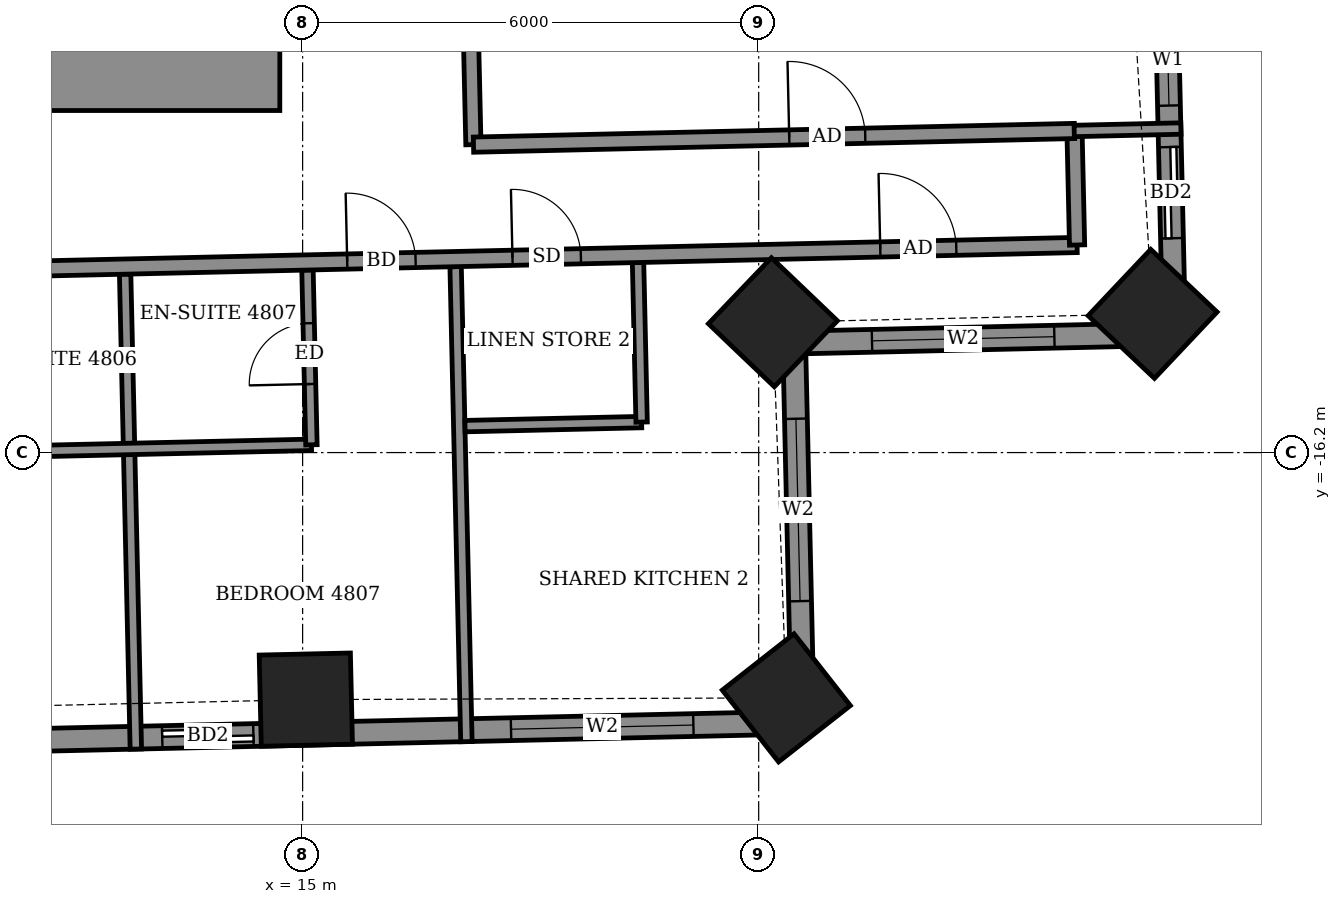
"""IFC4 building model, lengths in metres.
Left out: names, types, materials, properties, quantities, classifications, styles, units other than length and angle.
Written with IfcOpenShell. Run it as: python <this file> out.ifc"""

import sys

from ifc_helpers import new_model, si_unit, direction, frame, frame_2d, origin, origin_2d, place, context, subcontext, project, spatial, rectangle, extrude, element, fill, save


model = new_model("IFC4")
c1 = context("Model", 3, precision=1e-05, world=origin(), true_north=direction((0.0, 1.0)))
c2 = subcontext(c1, "Body", "Model", "MODEL_VIEW")
j1 = project(units=[si_unit("LENGTHUNIT", "METRE"), si_unit("PLANEANGLEUNIT", "RADIAN")], contexts=[c1])
p1 = place(None, origin())
s1 = spatial("IfcSite", under=j1, at=p1, CompositionType="ELEMENT")
p2 = place(p1, origin())
s2 = spatial("IfcBuilding", under=s1, at=p2, CompositionType="ELEMENT")
p3 = place(p2, frame((0.0, 0.0, 189.7)))
s3 = spatial("IfcBuildingStorey", under=s2, at=p3, CompositionType="ELEMENT", Elevation=189.7)
for number, where, z_axis, x_axis in (
    (1, (15.042, -19.45, -0.55), (0.0, 0.0, 1.0), (1.0, 0.023, 0.0)),
    (2, (21.364, -19.427, -0.55), (0.0, 0.0, 1.0), (0.787, 0.617, 0.0)),
    (3, (21.187, -14.486, -0.55), (0.0, 0.0, 1.0), (0.691, 0.723, 0.0)),
    (4, (26.183, -14.375, -0.55), (0.0, 0.0, 1.0), (0.686, 0.727, 0.0)),
):
    element("IfcColumn", number, at=place(p3, frame(where, z_axis=z_axis, x_axis=x_axis)), inside=s3, PredefinedType="COLUMN", context=c2, shape_type="SweptSolid", body=[
        extrude(rectangle(XDim=1.2, YDim=1.2, at=origin_2d()), origin(), (0.0, 0.0, 1.0), 3.6),
    ])
p4 = place(p3, frame((26.466, -14.64, 0.0), z_axis=(0.0, 0.0, 1.0), x_axis=(-0.022735782058, 0.999741508698, 0.0)))
e5 = element("IfcWall", 5, at=p4, inside=s3, PredefinedType="SOLIDWALL", context=c2, shape_type="SweptSolid", body=[
    extrude(rectangle(XDim=10.03, YDim=0.3, at=frame_2d((5.015, 0.0))), origin(), (0.0, 0.0, 1.0), 2.55),
])
p5 = place(p4, frame((1.26, 0.0, 0.0)))
e6 = element("IfcOpeningElement", 6, at=p5, cuts=e5, PredefinedType="OPENING", context=c2, shape_type="SweptSolid", body=[
    extrude(rectangle(XDim=1.2, YDim=2.4, at=frame_2d((0.6, 1.2))), frame((0.0, 0.16, 0.0), z_axis=(0.0, -1.0, 0.0), x_axis=(1.0, 0.0, 0.0)), (0.0, 0.0, 1.0), 0.32),
])
p6 = place(p4, frame((3.006, 0.0, 0.9)))
e7 = element("IfcOpeningElement", 7, at=p6, cuts=e5, PredefinedType="OPENING", context=c2, shape_type="SweptSolid", body=[
    extrude(rectangle(XDim=1.2, YDim=1.5, at=frame_2d((0.6, 0.75))), frame((0.0, 0.16, 0.0), z_axis=(0.0, -1.0, 0.0), x_axis=(1.0, 0.0, 0.0)), (0.0, 0.0, 1.0), 0.32),
])
p7 = place(p3, frame((-18.189, -20.655, 0.0), z_axis=(0.0, 0.0, 1.0), x_axis=(0.999742285265, 0.022701609063, 0.0)))
e8 = element("IfcWall", 8, at=p7, inside=s3, PredefinedType="SOLIDWALL", context=c2, shape_type="SweptSolid", body=[
    extrude(rectangle(XDim=39.78, YDim=0.3, at=frame_2d((19.89, 0.0))), origin(), (0.0, 0.0, 1.0), 3.05),
])
p8 = place(p7, frame((1.948, 0.0, 0.0)))
e9 = element("IfcOpeningElement", 9, at=p8, cuts=e8, PredefinedType="OPENING", context=c2, shape_type="SweptSolid", body=[
    extrude(rectangle(XDim=1.5, YDim=2.4, at=frame_2d((0.75, 1.2))), frame((0.0, 0.16, 0.0), z_axis=(0.0, -1.0, 0.0), x_axis=(1.0, 0.0, 0.0)), (0.0, 0.0, 1.0), 0.32),
])
p9 = place(p7, frame((7.24, 0.0, 0.0)))
e10 = element("IfcOpeningElement", 10, at=p9, cuts=e8, PredefinedType="OPENING", context=c2, shape_type="SweptSolid", body=[
    extrude(rectangle(XDim=1.5, YDim=2.4, at=frame_2d((0.75, 1.2))), frame((0.0, 0.16, 0.0), z_axis=(0.0, -1.0, 0.0), x_axis=(1.0, 0.0, 0.0)), (0.0, 0.0, 1.0), 0.32),
])
p10 = place(p7, frame((10.23, 0.0, 0.0)))
e11 = element("IfcOpeningElement", 11, at=p10, cuts=e8, PredefinedType="OPENING", context=c2, shape_type="SweptSolid", body=[
    extrude(rectangle(XDim=1.5, YDim=2.4, at=frame_2d((0.75, 1.2))), frame((0.0, 0.16, 0.0), z_axis=(0.0, -1.0, 0.0), x_axis=(1.0, 0.0, 0.0)), (0.0, 0.0, 1.0), 0.32),
])
p11 = place(p7, frame((14.955, 0.0, 0.0)))
e12 = element("IfcOpeningElement", 12, at=p11, cuts=e8, PredefinedType="OPENING", context=c2, shape_type="SweptSolid", body=[
    extrude(rectangle(XDim=1.5, YDim=2.4, at=frame_2d((0.75, 1.2))), frame((0.0, 0.16, 0.0), z_axis=(0.0, -1.0, 0.0), x_axis=(1.0, 0.0, 0.0)), (0.0, 0.0, 1.0), 0.32),
])
p12 = place(p7, frame((20.67, 0.0, 0.0)))
e13 = element("IfcOpeningElement", 13, at=p12, cuts=e8, PredefinedType="OPENING", context=c2, shape_type="SweptSolid", body=[
    extrude(rectangle(XDim=1.2, YDim=2.4, at=frame_2d((0.6, 1.2))), frame((0.0, 0.16, 0.0), z_axis=(0.0, -1.0, 0.0), x_axis=(1.0, 0.0, 0.0)), (0.0, 0.0, 1.0), 0.32),
])
p13 = place(p7, frame((23.51, 0.0, 0.0)))
e14 = element("IfcOpeningElement", 14, at=p13, cuts=e8, PredefinedType="OPENING", context=c2, shape_type="SweptSolid", body=[
    extrude(rectangle(XDim=1.5, YDim=2.4, at=frame_2d((0.75, 1.2))), frame((0.0, 0.16, 0.0), z_axis=(0.0, -1.0, 0.0), x_axis=(1.0, 0.0, 0.0)), (0.0, 0.0, 1.0), 0.32),
])
p14 = place(p7, frame((28.21, 0.0, 0.0)))
e15 = element("IfcOpeningElement", 15, at=p14, cuts=e8, PredefinedType="OPENING", context=c2, shape_type="SweptSolid", body=[
    extrude(rectangle(XDim=1.5, YDim=2.4, at=frame_2d((0.75, 1.2))), frame((0.0, 0.16, 0.0), z_axis=(0.0, -1.0, 0.0), x_axis=(1.0, 0.0, 0.0)), (0.0, 0.0, 1.0), 0.32),
])
p15 = place(p7, frame((31.35, 0.0, 0.0)))
e16 = element("IfcOpeningElement", 16, at=p15, cuts=e8, PredefinedType="OPENING", context=c2, shape_type="SweptSolid", body=[
    extrude(rectangle(XDim=1.2, YDim=2.4, at=frame_2d((0.6, 1.2))), frame((0.0, 0.16, 0.0), z_axis=(0.0, -1.0, 0.0), x_axis=(1.0, 0.0, 0.0)), (0.0, 0.0, 1.0), 0.32),
])
p16 = place(p7, frame((35.94, 0.0, 0.9)))
e17 = element("IfcOpeningElement", 17, at=p16, cuts=e8, PredefinedType="OPENING", context=c2, shape_type="SweptSolid", body=[
    extrude(rectangle(XDim=2.4, YDim=1.5, at=frame_2d((1.2, 0.75))), frame((0.0, 0.16, 0.0), z_axis=(0.0, -1.0, 0.0), x_axis=(1.0, 0.0, 0.0)), (0.0, 0.0, 1.0), 0.32),
])
p17 = place(p3, frame((21.581, -19.752, 0.0), z_axis=(0.0, 0.0, 1.0), x_axis=(-0.022801259434, 0.999740017489, 0.0)))
e18 = element("IfcWall", 18, at=p17, inside=s3, PredefinedType="SOLIDWALL", context=c2, shape_type="SweptSolid", body=[
    extrude(rectangle(XDim=5.0, YDim=0.3, at=frame_2d((2.5, 0.0))), origin(), (0.0, 0.0, 1.0), 2.55),
])
p18 = place(p17, frame((1.598, 0.0, 0.9)))
e19 = element("IfcOpeningElement", 19, at=p18, cuts=e18, PredefinedType="OPENING", context=c2, shape_type="SweptSolid", body=[
    extrude(rectangle(XDim=2.4, YDim=1.5, at=frame_2d((1.2, 0.75))), frame((0.0, 0.16, 0.0), z_axis=(0.0, -1.0, 0.0), x_axis=(1.0, 0.0, 0.0)), (0.0, 0.0, 1.0), 0.32),
])
p19 = place(p3, frame((21.467, -14.753, 0.0), z_axis=(0.0, 0.0, 1.0), x_axis=(0.999744450377, 0.022606059803, 0.0)))
e20 = element("IfcWall", 20, at=p19, inside=s3, PredefinedType="SOLIDWALL", context=c2, shape_type="SweptSolid", body=[
    extrude(rectangle(XDim=5.0, YDim=0.3, at=frame_2d((2.5, 0.0))), origin(), (0.0, 0.0, 1.0), 2.55),
])
p20 = place(p19, frame((1.024, 0.0, 0.9)))
e21 = element("IfcOpeningElement", 21, at=p20, cuts=e20, PredefinedType="OPENING", context=c2, shape_type="SweptSolid", body=[
    extrude(rectangle(XDim=2.4, YDim=1.5, at=frame_2d((1.2, 0.75))), frame((0.0, 0.16, 0.0), z_axis=(0.0, -1.0, 0.0), x_axis=(1.0, 0.0, 0.0)), (0.0, 0.0, 1.0), 0.32),
])
p21 = place(p3, frame((12.806, -20.101, 0.0), z_axis=(0.0, 0.0, 1.0), x_axis=(-0.022540379945, 0.999745933361, 0.0)))
e22 = element("IfcWall", 22, at=p21, inside=s3, PredefinedType="PARTITIONING", context=c2, shape_type="SweptSolid", body=[
    extrude(rectangle(XDim=6.25, YDim=0.15, at=frame_2d((3.125, 0.0))), origin(), (0.0, 0.0, 1.0), 2.55),
])
p22 = place(p3, frame((17.155, -20.003, 0.0), z_axis=(0.0, 0.0, 1.0), x_axis=(-0.022732052173, 0.999741593515, 0.0)))
e23 = element("IfcWall", 23, at=p22, inside=s3, PredefinedType="PARTITIONING", context=c2, shape_type="SweptSolid", body=[
    extrude(rectangle(XDim=6.251, YDim=0.15, at=frame_2d((3.125, 0.0))), origin(), (0.0, 0.0, 1.0), 2.55),
])
p23 = place(p3, frame((10.317, -16.207, 0.0), z_axis=(0.0, 0.0, 1.0), x_axis=(0.99974154664, 0.022734113616, 0.0)))
e24 = element("IfcWall", 24, at=p23, inside=s3, PredefinedType="PARTITIONING", context=c2, shape_type="SweptSolid", body=[
    extrude(rectangle(XDim=4.8, YDim=0.15, at=frame_2d((2.4, 0.0))), origin(), (0.0, 0.0, 1.0), 3.05),
])
p24 = place(p3, frame((15.116, -16.098, 0.0), z_axis=(0.0, 0.0, 1.0), x_axis=(-0.022615284993, 0.999744241736, 0.0)))
e25 = element("IfcWall", 25, at=p24, inside=s3, PredefinedType="PARTITIONING", context=c2, shape_type="SweptSolid", body=[
    extrude(rectangle(XDim=2.299, YDim=0.15, at=frame_2d((1.15, 0.0))), origin(), (0.0, 0.0, 1.0), 3.05),
])
p25 = place(p24, frame((0.8, 0.0, 0.0)))
e26 = element("IfcOpeningElement", 26, at=p25, cuts=e25, PredefinedType="OPENING", context=c2, shape_type="SweptSolid", body=[
    extrude(rectangle(XDim=0.8, YDim=2.1, at=frame_2d((0.4, 1.05))), frame((0.0, 0.085, 0.0), z_axis=(0.0, -1.0, 0.0), x_axis=(1.0, 0.0, 0.0)), (0.0, 0.0, 1.0), 0.17),
])
p26 = place(p3, frame((17.136, -15.852, 0.0), z_axis=(0.0, 0.0, 1.0), x_axis=(0.999740260747, 0.02279059109, 0.0)))
e27 = element("IfcWall", 27, at=p26, inside=s3, PredefinedType="PARTITIONING", context=c2, shape_type="SweptSolid", body=[
    extrude(rectangle(XDim=2.324, YDim=0.15, at=frame_2d((1.162, 0.0))), origin(), (0.0, 0.0, 1.0), 3.05),
])
p27 = place(p3, frame((19.46, -15.799, 0.0), z_axis=(0.0, 0.0, 1.0), x_axis=(-0.022325208909, 0.999750761464, 0.0)))
e28 = element("IfcWall", 28, at=p27, inside=s3, PredefinedType="PARTITIONING", context=c2, shape_type="SweptSolid", body=[
    extrude(rectangle(XDim=2.1, YDim=0.15, at=frame_2d((1.05, 0.0))), origin(), (0.0, 0.0, 1.0), 3.05),
])
p28 = place(p3, frame((-21.279, -14.523, 0.0), z_axis=(0.0, 0.0, 1.0), x_axis=(0.999742878501, 0.022675468818, 0.0)))
e29 = element("IfcWall", 29, at=p28, inside=s3, PredefinedType="PARTITIONING", context=c2, shape_type="SweptSolid", body=[
    extrude(rectangle(XDim=46.48, YDim=0.2, at=frame_2d((23.24, 0.0))), origin(), (0.0, 0.0, 1.0), 3.05),
])
p29 = place(p28, frame((1.4, 0.0, 0.0)))
e30 = element("IfcOpeningElement", 30, at=p29, cuts=e29, PredefinedType="OPENING", context=c2, shape_type="SweptSolid", body=[
    extrude(rectangle(XDim=1.0, YDim=2.1, at=frame_2d((0.5, 1.05))), frame((0.0, 0.11, 0.0), z_axis=(0.0, -1.0, 0.0), x_axis=(1.0, 0.0, 0.0)), (0.0, 0.0, 1.0), 0.22),
])
p30 = place(p28, frame((5.95, 0.0, 0.0)))
e31 = element("IfcOpeningElement", 31, at=p30, cuts=e29, PredefinedType="OPENING", context=c2, shape_type="SweptSolid", body=[
    extrude(rectangle(XDim=0.9, YDim=2.1, at=frame_2d((0.45, 1.05))), frame((0.0, 0.11, 0.0), z_axis=(0.0, -1.0, 0.0), x_axis=(1.0, 0.0, 0.0)), (0.0, 0.0, 1.0), 0.22),
])
p31 = place(p28, frame((10.575, 0.0, 0.0)))
e32 = element("IfcOpeningElement", 32, at=p31, cuts=e29, PredefinedType="OPENING", context=c2, shape_type="SweptSolid", body=[
    extrude(rectangle(XDim=0.9, YDim=2.1, at=frame_2d((0.45, 1.05))), frame((0.0, 0.11, 0.0), z_axis=(0.0, -1.0, 0.0), x_axis=(1.0, 0.0, 0.0)), (0.0, 0.0, 1.0), 0.22),
])
p32 = place(p28, frame((12.625, 0.0, 0.0)))
e33 = element("IfcOpeningElement", 33, at=p32, cuts=e29, PredefinedType="OPENING", context=c2, shape_type="SweptSolid", body=[
    extrude(rectangle(XDim=0.9, YDim=2.1, at=frame_2d((0.45, 1.05))), frame((0.0, 0.11, 0.0), z_axis=(0.0, -1.0, 0.0), x_axis=(1.0, 0.0, 0.0)), (0.0, 0.0, 1.0), 0.22),
])
p33 = place(p28, frame((19.4, 0.0, 0.0)))
e34 = element("IfcOpeningElement", 34, at=p33, cuts=e29, PredefinedType="OPENING", context=c2, shape_type="SweptSolid", body=[
    extrude(rectangle(XDim=0.9, YDim=2.1, at=frame_2d((0.45, 1.05))), frame((0.0, 0.11, 0.0), z_axis=(0.0, -1.0, 0.0), x_axis=(1.0, 0.0, 0.0)), (0.0, 0.0, 1.0), 0.22),
])
p34 = place(p28, frame((21.375, 0.0, 0.0)))
e35 = element("IfcOpeningElement", 35, at=p34, cuts=e29, PredefinedType="OPENING", context=c2, shape_type="SweptSolid", body=[
    extrude(rectangle(XDim=0.9, YDim=2.1, at=frame_2d((0.45, 1.05))), frame((0.0, 0.11, 0.0), z_axis=(0.0, -1.0, 0.0), x_axis=(1.0, 0.0, 0.0)), (0.0, 0.0, 1.0), 0.22),
])
p35 = place(p28, frame((28.15, 0.0, 0.0)))
e36 = element("IfcOpeningElement", 36, at=p35, cuts=e29, PredefinedType="OPENING", context=c2, shape_type="SweptSolid", body=[
    extrude(rectangle(XDim=0.9, YDim=2.1, at=frame_2d((0.45, 1.05))), frame((0.0, 0.11, 0.0), z_axis=(0.0, -1.0, 0.0), x_axis=(1.0, 0.0, 0.0)), (0.0, 0.0, 1.0), 0.22),
])
p36 = place(p28, frame((30.1, 0.0, 0.0)))
e37 = element("IfcOpeningElement", 37, at=p36, cuts=e29, PredefinedType="OPENING", context=c2, shape_type="SweptSolid", body=[
    extrude(rectangle(XDim=0.9, YDim=2.1, at=frame_2d((0.45, 1.05))), frame((0.0, 0.11, 0.0), z_axis=(0.0, -1.0, 0.0), x_axis=(1.0, 0.0, 0.0)), (0.0, 0.0, 1.0), 0.22),
])
p37 = place(p28, frame((36.875, 0.0, 0.0)))
e38 = element("IfcOpeningElement", 38, at=p37, cuts=e29, PredefinedType="OPENING", context=c2, shape_type="SweptSolid", body=[
    extrude(rectangle(XDim=0.9, YDim=2.1, at=frame_2d((0.45, 1.05))), frame((0.0, 0.11, 0.0), z_axis=(0.0, -1.0, 0.0), x_axis=(1.0, 0.0, 0.0)), (0.0, 0.0, 1.0), 0.22),
])
p38 = place(p28, frame((43.89, 0.0, 0.0)))
e39 = element("IfcOpeningElement", 39, at=p38, cuts=e29, PredefinedType="OPENING", context=c2, shape_type="SweptSolid", body=[
    extrude(rectangle(XDim=1.0, YDim=2.1, at=frame_2d((0.5, 1.05))), frame((0.0, 0.11, 0.0), z_axis=(0.0, -1.0, 0.0), x_axis=(1.0, 0.0, 0.0)), (0.0, 0.0, 1.0), 0.22),
])
p39 = place(p28, frame((39.05, 0.0, 0.0)))
e40 = element("IfcOpeningElement", 40, at=p39, cuts=e29, PredefinedType="OPENING", context=c2, shape_type="SweptSolid", body=[
    extrude(rectangle(XDim=0.9, YDim=2.1, at=frame_2d((0.45, 1.05))), frame((0.0, 0.11, 0.0), z_axis=(0.0, -1.0, 0.0), x_axis=(1.0, 0.0, 0.0)), (0.0, 0.0, 1.0), 0.22),
])
p40 = place(p3, frame((25.189, -13.469, 0.0), z_axis=(0.0, 0.0, 1.0), x_axis=(-0.022617910375, 0.999744182344, 0.0)))
e41 = element("IfcWall", 41, at=p40, inside=s3, PredefinedType="PARTITIONING", context=c2, shape_type="SweptSolid", body=[
    extrude(rectangle(XDim=1.5, YDim=0.2, at=frame_2d((0.75, 0.0))), origin(), (0.0, 0.0, 1.0), 3.05),
])
p41 = place(p3, frame((17.247, -12.149, 0.0), z_axis=(0.0, 0.0, 1.0), x_axis=(-0.022729111383, 0.999741660378, 0.0)))
e42 = element("IfcWall", 42, at=p41, inside=s3, PredefinedType="PARTITIONING", context=c2, shape_type="SweptSolid", body=[
    extrude(rectangle(XDim=4.318, YDim=0.2, at=frame_2d((2.159, 0.0))), origin(), (0.0, 0.0, 1.0), 3.05),
])
p42 = place(p3, frame((17.248, -12.149, 0.0), z_axis=(0.0, 0.0, 1.0), x_axis=(0.999741181744, 0.022750154412, 0.0)))
e43 = element("IfcWall", 43, at=p42, inside=s3, PredefinedType="PARTITIONING", context=c2, shape_type="SweptSolid", body=[
    extrude(rectangle(XDim=7.909, YDim=0.2, at=frame_2d((3.955, 0.0))), origin(), (0.0, 0.0, 1.0), 3.05),
])
p43 = place(p42, frame((4.155, 0.0, 0.0)))
e44 = element("IfcOpeningElement", 44, at=p43, cuts=e43, PredefinedType="OPENING", context=c2, shape_type="SweptSolid", body=[
    extrude(rectangle(XDim=1.0, YDim=2.1, at=frame_2d((0.5, 1.05))), frame((0.0, 0.11, 0.0), z_axis=(0.0, -1.0, 0.0), x_axis=(1.0, 0.0, 0.0)), (0.0, 0.0, 1.0), 0.22),
])
p44 = place(p3, frame((25.151, -11.969, 0.0), z_axis=(0.0, 0.0, 1.0), x_axis=(0.999740667531, 0.022772739949, 0.0)))
e45 = element("IfcWall", 45, at=p44, inside=s3, PredefinedType="PARTITIONING", context=c2, shape_type="SweptSolid", body=[
    extrude(rectangle(XDim=1.404, YDim=0.15, at=frame_2d((0.702, 0.0))), origin(), (0.0, 0.0, 1.0), 2.55),
])
p45 = place(p3, frame((-14.7, -11.25, 0.0), z_axis=(0.0, 0.0, 1.0), x_axis=(1.0, 0.0, 0.0)))
e46 = element("IfcWall", 46, at=p45, inside=s3, PredefinedType="SHEAR", context=c2, shape_type="SweptSolid", body=[
    extrude(rectangle(XDim=29.4, YDim=0.9, at=frame_2d((14.7, 0.0))), origin(), (0.0, 0.0, 1.0), 3.6),
])
p46 = place(p5, origin())
e47 = element("IfcDoor", 47, at=p46, inside=s3, OperationType="SLIDING_TO_LEFT", PredefinedType="DOOR", context=c2, shape_type="SweptSolid", body=[
    extrude(rectangle(XDim=1.2, YDim=2.4, at=frame_2d((0.6, 1.2))), frame((0.0, 0.025, 0.0), z_axis=(0.0, -1.0, 0.0), x_axis=(1.0, 0.0, 0.0)), (0.0, 0.0, 1.0), 0.05),
])
fill(e6, e47)
p47 = place(p6, origin())
e48 = element("IfcWindow", 48, at=p47, inside=s3, PartitioningType="SINGLE_PANEL", PredefinedType="WINDOW", context=c2, shape_type="SweptSolid", body=[
    extrude(rectangle(XDim=1.2, YDim=1.5, at=frame_2d((0.6, 0.75))), frame((0.0, 0.03, 0.0), z_axis=(0.0, -1.0, 0.0), x_axis=(1.0, 0.0, 0.0)), (0.0, 0.0, 1.0), 0.06),
])
fill(e7, e48)
p48 = place(p15, origin())
e49 = element("IfcDoor", 49, at=p48, inside=s3, OperationType="SLIDING_TO_LEFT", PredefinedType="DOOR", context=c2, shape_type="SweptSolid", body=[
    extrude(rectangle(XDim=1.2, YDim=2.4, at=frame_2d((0.6, 1.2))), frame((0.0, 0.025, 0.0), z_axis=(0.0, -1.0, 0.0), x_axis=(1.0, 0.0, 0.0)), (0.0, 0.0, 1.0), 0.05),
])
fill(e16, e49)
p49 = place(p16, origin())
e50 = element("IfcWindow", 50, at=p49, inside=s3, PartitioningType="DOUBLE_PANEL_VERTICAL", PredefinedType="WINDOW", context=c2, shape_type="SweptSolid", body=[
    extrude(rectangle(XDim=2.4, YDim=1.5, at=frame_2d((1.2, 0.75))), frame((0.0, 0.03, 0.0), z_axis=(0.0, -1.0, 0.0), x_axis=(1.0, 0.0, 0.0)), (0.0, 0.0, 1.0), 0.06),
])
fill(e17, e50)
p50 = place(p18, origin())
e51 = element("IfcWindow", 51, at=p50, inside=s3, PartitioningType="DOUBLE_PANEL_VERTICAL", PredefinedType="WINDOW", context=c2, shape_type="SweptSolid", body=[
    extrude(rectangle(XDim=2.4, YDim=1.5, at=frame_2d((1.2, 0.75))), frame((0.0, 0.03, 0.0), z_axis=(0.0, -1.0, 0.0), x_axis=(1.0, 0.0, 0.0)), (0.0, 0.0, 1.0), 0.06),
])
fill(e19, e51)
p51 = place(p20, origin())
e52 = element("IfcWindow", 52, at=p51, inside=s3, PartitioningType="DOUBLE_PANEL_VERTICAL", PredefinedType="WINDOW", context=c2, shape_type="SweptSolid", body=[
    extrude(rectangle(XDim=2.4, YDim=1.5, at=frame_2d((1.2, 0.75))), frame((0.0, 0.03, 0.0), z_axis=(0.0, -1.0, 0.0), x_axis=(1.0, 0.0, 0.0)), (0.0, 0.0, 1.0), 0.06),
])
fill(e21, e52)
p52 = place(p37, origin())
e53 = element("IfcDoor", 53, at=p52, inside=s3, OperationType="SINGLE_SWING_LEFT", PredefinedType="DOOR", context=c2, shape_type="SweptSolid", body=[
    extrude(rectangle(XDim=0.9, YDim=2.1, at=frame_2d((0.45, 1.05))), frame((0.0, 0.025, 0.0), z_axis=(0.0, -1.0, 0.0), x_axis=(1.0, 0.0, 0.0)), (0.0, 0.0, 1.0), 0.05),
])
fill(e38, e53)
p53 = place(p25, origin())
e54 = element("IfcDoor", 54, at=p53, inside=s3, OperationType="SINGLE_SWING_LEFT", PredefinedType="DOOR", context=c2, shape_type="SweptSolid", body=[
    extrude(rectangle(XDim=0.8, YDim=2.1, at=frame_2d((0.4, 1.05))), frame((0.0, 0.025, 0.0), z_axis=(0.0, -1.0, 0.0), x_axis=(1.0, 0.0, 0.0)), (0.0, 0.0, 1.0), 0.05),
])
fill(e26, e54)
p54 = place(p38, origin())
e55 = element("IfcDoor", 55, at=p54, inside=s3, OperationType="SINGLE_SWING_RIGHT", PredefinedType="DOOR", context=c2, shape_type="SweptSolid", body=[
    extrude(rectangle(XDim=1.0, YDim=2.1, at=frame_2d((0.5, 1.05))), frame((0.0, 0.025, 0.0), z_axis=(0.0, -1.0, 0.0), x_axis=(1.0, 0.0, 0.0)), (0.0, 0.0, 1.0), 0.05),
])
fill(e39, e55)
p55 = place(p39, origin())
e56 = element("IfcDoor", 56, at=p55, inside=s3, OperationType="SINGLE_SWING_RIGHT", PredefinedType="DOOR", context=c2, shape_type="SweptSolid", body=[
    extrude(rectangle(XDim=0.9, YDim=2.1, at=frame_2d((0.45, 1.05))), frame((0.0, 0.025, 0.0), z_axis=(0.0, -1.0, 0.0), x_axis=(1.0, 0.0, 0.0)), (0.0, 0.0, 1.0), 0.05),
])
fill(e40, e56)
p56 = place(p43, origin())
e57 = element("IfcDoor", 57, at=p56, inside=s3, OperationType="SINGLE_SWING_LEFT", PredefinedType="DOOR", context=c2, shape_type="SweptSolid", body=[
    extrude(rectangle(XDim=1.0, YDim=2.1, at=frame_2d((0.5, 1.05))), frame((0.0, 0.025, 0.0), z_axis=(0.0, -1.0, 0.0), x_axis=(1.0, 0.0, 0.0)), (0.0, 0.0, 1.0), 0.05),
])
fill(e44, e57)
save(model, sys.argv[1])
